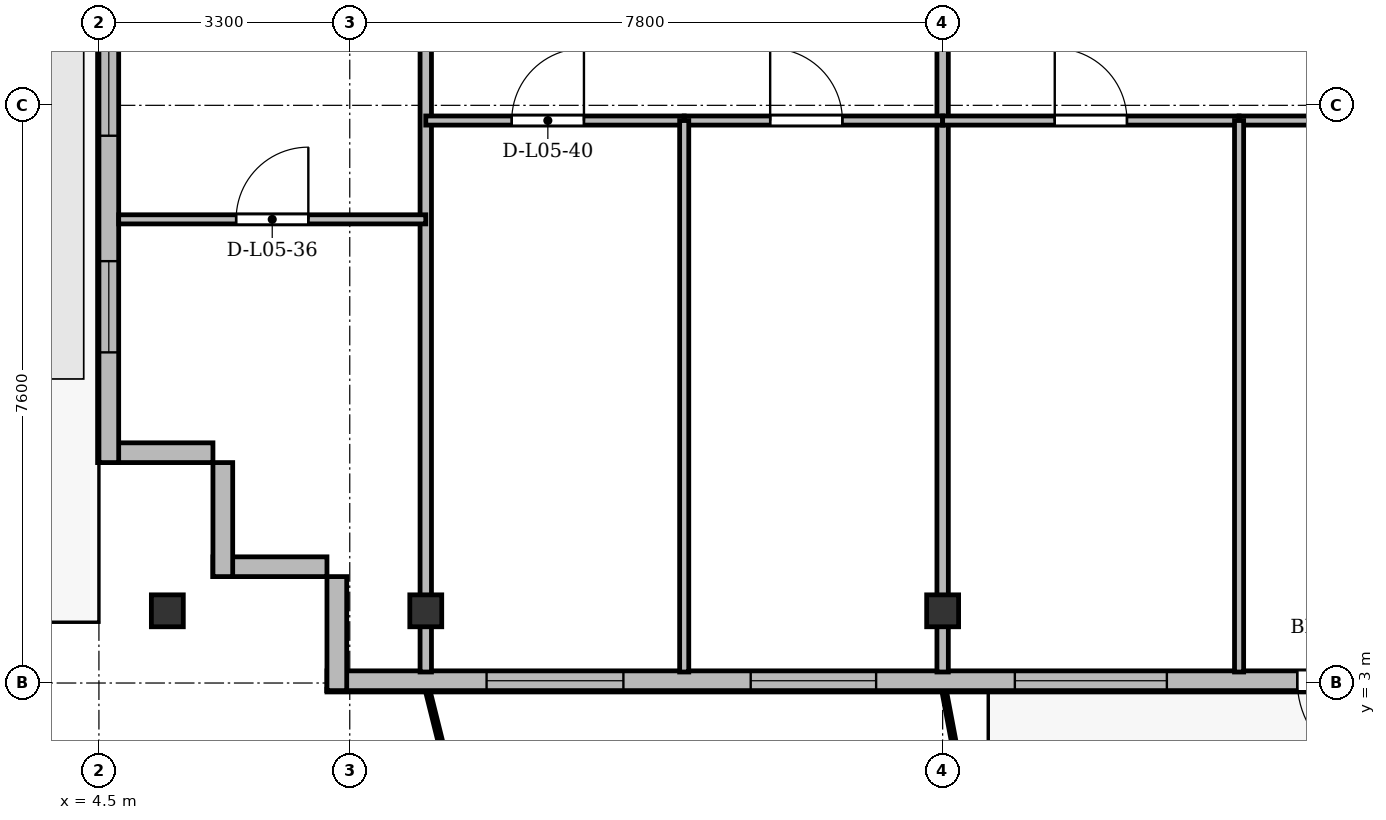
"""IFC4 building model, lengths in metres.
Left out: names, types, materials, properties, quantities, classifications, styles, units other than length and angle.
Written with IfcOpenShell. Run it as: python <this file> out.ifc"""

import sys

from ifc_helpers import new_model, si_unit, direction, frame, frame_2d, origin, origin_2d, place, context, subcontext, project, spatial, rectangle, i_section, extrude, source, transform, mapped, element, fill, save


model = new_model("IFC4")
c1 = context("Model", 3, precision=1e-05, world=origin(), true_north=direction((0.0, 1.0)))
c2 = subcontext(c1, "Body", "Model", "MODEL_VIEW")
j1 = project(units=[si_unit("LENGTHUNIT", "METRE"), si_unit("PLANEANGLEUNIT", "RADIAN")], contexts=[c1])
p1 = place(None, origin())
s1 = spatial("IfcSite", under=j1, at=p1, CompositionType="ELEMENT")
p2 = place(p1, origin())
s2 = spatial("IfcBuilding", under=s1, at=p2, CompositionType="ELEMENT")
p3 = place(p2, frame((0.0, 0.0, 23.5)))
s3 = spatial("IfcBuildingStorey", under=s2, at=p3, CompositionType="ELEMENT", Elevation=23.5)
m1 = source(origin(), c2, "Body", "SweptSolid", [
    extrude(i_section(OverallWidth=0.42, OverallDepth=0.42, WebThickness=0.026, FlangeThickness=0.04, at=origin_2d()), origin(), (0.0, 0.0, 1.0), 3.6),
])
for number, where, z_axis, x_axis in (
    (1, (5.4, 3.95, 0.0), (0.0, 0.0, 1.0), (1.0, 0.0, 0.0)),
    (2, (8.8, 3.95, 0.0), (0.0, 0.0, 1.0), (1.0, 0.0, 0.0)),
    (3, (15.6, 3.95, 0.0), (0.0, 0.0, 1.0), (1.0, 0.0, 0.0)),
):
    element("IfcColumn", number, at=place(p3, frame(where, z_axis=z_axis, x_axis=x_axis)), inside=s3, PredefinedType="COLUMN", context=c2, shape_type="MappedRepresentation", body=[
        mapped(m1, transform((0.0, 0.0, 0.0), x_axis=(1.0, 0.0, 0.0), y_axis=(0.0, 1.0, 0.0), z_axis=(0.0, 0.0, 1.0), scale=1.0)),
    ])
for number, where, z_axis, x_axis in (
    (4, (7.5, 4.53, 0.0), (0.0, 0.0, 1.0), (-1.0, 0.0, 0.0)),
    (5, (6.13, 4.4, 0.0), (0.0, 0.0, 1.0), (0.0, 1.0, 0.0)),
):
    element("IfcWall", number, at=place(p3, frame(where, z_axis=z_axis, x_axis=x_axis)), inside=s3, PredefinedType="SOLIDWALL", context=c2, shape_type="SweptSolid", body=[
        extrude(rectangle(XDim=1.5, YDim=0.26, at=frame_2d((0.75, 0.0))), origin(), (0.0, 0.0, 1.0), 3.34),
    ])
p4 = place(p3, frame((6.0, 6.03, 0.0), z_axis=(0.0, 0.0, 1.0), x_axis=(-1.0, 0.0, 0.0)))
e6 = element("IfcWall", 6, at=p4, inside=s3, PredefinedType="SOLIDWALL", context=c2, shape_type="SweptSolid", body=[
    extrude(rectangle(XDim=1.5, YDim=0.26, at=frame_2d((0.75, 0.0))), origin(), (0.0, 0.0, 1.0), 2.752),
])
p5 = place(p3, frame((4.63, 5.9, 0.0), z_axis=(0.0, 0.0, 1.0), x_axis=(0.0, 1.0, 0.0)))
e7 = element("IfcWall", 7, at=p5, inside=s3, PredefinedType="SOLIDWALL", context=c2, shape_type="SweptSolid", body=[
    extrude(rectangle(XDim=39.6, YDim=0.26, at=frame_2d((19.8, 0.0))), origin(), (0.0, 0.0, 1.0), 3.34),
])
p6 = place(p5, frame((9.745, 0.0, 0.0)))
e8 = element("IfcOpeningElement", 8, at=p6, cuts=e7, PredefinedType="OPENING", context=c2, shape_type="SweptSolid", body=[
    extrude(rectangle(XDim=1.2, YDim=2.2, at=frame_2d((0.6, 1.1))), frame((0.0, 0.14, 0.0), z_axis=(0.0, -1.0, 0.0), x_axis=(1.0, 0.0, 0.0)), (0.0, 0.0, 1.0), 0.28),
])
p7 = place(p5, frame((1.45, 0.0, 0.92)))
e9 = element("IfcOpeningElement", 9, at=p7, cuts=e7, PredefinedType="OPENING", context=c2, shape_type="SweptSolid", body=[
    extrude(rectangle(XDim=1.2, YDim=1.65, at=frame_2d((0.6, 0.825))), frame((0.0, 0.14, 0.0), z_axis=(0.0, -1.0, 0.0), x_axis=(1.0, 0.0, 0.0)), (0.0, 0.0, 1.0), 0.28),
])
p8 = place(p5, frame((4.3, 0.0, 0.92)))
e10 = element("IfcOpeningElement", 10, at=p8, cuts=e7, PredefinedType="OPENING", context=c2, shape_type="SweptSolid", body=[
    extrude(rectangle(XDim=2.4, YDim=2.1, at=frame_2d((1.2, 1.05))), frame((0.0, 0.14, 0.0), z_axis=(0.0, -1.0, 0.0), x_axis=(1.0, 0.0, 0.0)), (0.0, 0.0, 1.0), 0.28),
])
p9 = place(p5, frame((33.9, 0.0, 0.92)))
e11 = element("IfcOpeningElement", 11, at=p9, cuts=e7, PredefinedType="OPENING", context=c2, shape_type="SweptSolid", body=[
    extrude(rectangle(XDim=1.2, YDim=1.65, at=frame_2d((0.6, 0.825))), frame((0.0, 0.14, 0.0), z_axis=(0.0, -1.0, 0.0), x_axis=(1.0, 0.0, 0.0)), (0.0, 0.0, 1.0), 0.28),
])
p10 = place(p5, frame((37.25, 0.0, 0.92)))
e12 = element("IfcOpeningElement", 12, at=p10, cuts=e7, PredefinedType="OPENING", context=c2, shape_type="SweptSolid", body=[
    extrude(rectangle(XDim=1.2, YDim=1.65, at=frame_2d((0.6, 0.825))), frame((0.0, 0.14, 0.0), z_axis=(0.0, -1.0, 0.0), x_axis=(1.0, 0.0, 0.0)), (0.0, 0.0, 1.0), 0.28),
])
p11 = place(p3, frame((66.9, 3.03, 0.0), z_axis=(0.0, 0.0, 1.0), x_axis=(-1.0, 0.0, 0.0)))
e13 = element("IfcWall", 13, at=p11, inside=s3, PredefinedType="SOLIDWALL", context=c2, shape_type="SweptSolid", body=[
    extrude(rectangle(XDim=59.4, YDim=0.26, at=frame_2d((29.7, 0.0))), origin(), (0.0, 0.0, 1.0), 3.34),
])
p12 = place(p11, frame((3.6, 0.0, 0.9)))
e14 = element("IfcOpeningElement", 14, at=p12, cuts=e13, PredefinedType="OPENING", context=c2, shape_type="SweptSolid", body=[
    extrude(rectangle(XDim=2.2, YDim=1.8, at=frame_2d((1.1, 0.9))), frame((0.0, 0.14, 0.0), z_axis=(0.0, -1.0, 0.0), x_axis=(1.0, 0.0, 0.0)), (0.0, 0.0, 1.0), 0.28),
])
p13 = place(p11, frame((9.3, 0.0, 0.9)))
e15 = element("IfcOpeningElement", 15, at=p13, cuts=e13, PredefinedType="OPENING", context=c2, shape_type="SweptSolid", body=[
    extrude(rectangle(XDim=1.5, YDim=1.75, at=frame_2d((0.75, 0.875))), frame((0.0, 0.14, 0.0), z_axis=(0.0, -1.0, 0.0), x_axis=(1.0, 0.0, 0.0)), (0.0, 0.0, 1.0), 0.28),
])
p14 = place(p11, frame((12.95, 0.0, 0.9)))
e16 = element("IfcOpeningElement", 16, at=p14, cuts=e13, PredefinedType="OPENING", context=c2, shape_type="SweptSolid", body=[
    extrude(rectangle(XDim=2.0, YDim=1.95, at=frame_2d((1.0, 0.975))), frame((0.0, 0.14, 0.0), z_axis=(0.0, -1.0, 0.0), x_axis=(1.0, 0.0, 0.0)), (0.0, 0.0, 1.0), 0.28),
])
p15 = place(p11, frame((17.007, 0.0, 0.0)))
e17 = element("IfcOpeningElement", 17, at=p15, cuts=e13, PredefinedType="OPENING", context=c2, shape_type="SweptSolid", body=[
    extrude(rectangle(XDim=1.2, YDim=2.2, at=frame_2d((0.6, 1.1))), frame((0.0, 0.14, 0.0), z_axis=(0.0, -1.0, 0.0), x_axis=(1.0, 0.0, 0.0)), (0.0, 0.0, 1.0), 0.28),
])
p16 = place(p11, frame((20.4, 0.0, 0.9)))
e18 = element("IfcOpeningElement", 18, at=p16, cuts=e13, PredefinedType="OPENING", context=c2, shape_type="SweptSolid", body=[
    extrude(rectangle(XDim=1.8, YDim=1.8, at=frame_2d((0.9, 0.9))), frame((0.0, 0.14, 0.0), z_axis=(0.0, -1.0, 0.0), x_axis=(1.0, 0.0, 0.0)), (0.0, 0.0, 1.0), 0.28),
])
p17 = place(p11, frame((23.65, 0.0, 0.9)))
e19 = element("IfcOpeningElement", 19, at=p17, cuts=e13, PredefinedType="OPENING", context=c2, shape_type="SweptSolid", body=[
    extrude(rectangle(XDim=2.2, YDim=1.8, at=frame_2d((1.1, 0.9))), frame((0.0, 0.14, 0.0), z_axis=(0.0, -1.0, 0.0), x_axis=(1.0, 0.0, 0.0)), (0.0, 0.0, 1.0), 0.28),
])
p18 = place(p11, frame((27.3, 0.0, 0.9)))
e20 = element("IfcOpeningElement", 20, at=p18, cuts=e13, PredefinedType="OPENING", context=c2, shape_type="SweptSolid", body=[
    extrude(rectangle(XDim=1.5, YDim=1.75, at=frame_2d((0.75, 0.875))), frame((0.0, 0.14, 0.0), z_axis=(0.0, -1.0, 0.0), x_axis=(1.0, 0.0, 0.0)), (0.0, 0.0, 1.0), 0.28),
])
p19 = place(p11, frame((32.0, 0.0, 0.9)))
e21 = element("IfcOpeningElement", 21, at=p19, cuts=e13, PredefinedType="OPENING", context=c2, shape_type="SweptSolid", body=[
    extrude(rectangle(XDim=2.0, YDim=1.95, at=frame_2d((1.0, 0.975))), frame((0.0, 0.14, 0.0), z_axis=(0.0, -1.0, 0.0), x_axis=(1.0, 0.0, 0.0)), (0.0, 0.0, 1.0), 0.28),
])
p20 = place(p11, frame((36.675, 0.0, 0.9)))
e22 = element("IfcOpeningElement", 22, at=p20, cuts=e13, PredefinedType="OPENING", context=c2, shape_type="SweptSolid", body=[
    extrude(rectangle(XDim=1.65, YDim=1.85, at=frame_2d((0.825, 0.925))), frame((0.0, 0.14, 0.0), z_axis=(0.0, -1.0, 0.0), x_axis=(1.0, 0.0, 0.0)), (0.0, 0.0, 1.0), 0.28),
])
p21 = place(p11, frame((39.0, 0.0, 0.9)))
e23 = element("IfcOpeningElement", 23, at=p21, cuts=e13, PredefinedType="OPENING", context=c2, shape_type="SweptSolid", body=[
    extrude(rectangle(XDim=1.8, YDim=1.8, at=frame_2d((0.9, 0.9))), frame((0.0, 0.14, 0.0), z_axis=(0.0, -1.0, 0.0), x_axis=(1.0, 0.0, 0.0)), (0.0, 0.0, 1.0), 0.28),
])
p22 = place(p11, frame((41.55, 0.0, 0.9)))
e24 = element("IfcOpeningElement", 24, at=p22, cuts=e13, PredefinedType="OPENING", context=c2, shape_type="SweptSolid", body=[
    extrude(rectangle(XDim=1.5, YDim=1.75, at=frame_2d((0.75, 0.875))), frame((0.0, 0.14, 0.0), z_axis=(0.0, -1.0, 0.0), x_axis=(1.0, 0.0, 0.0)), (0.0, 0.0, 1.0), 0.28),
])
p23 = place(p11, frame((45.435, 0.0, 0.0)))
e25 = element("IfcOpeningElement", 25, at=p23, cuts=e13, PredefinedType="OPENING", context=c2, shape_type="SweptSolid", body=[
    extrude(rectangle(XDim=1.2, YDim=2.2, at=frame_2d((0.6, 1.1))), frame((0.0, 0.14, 0.0), z_axis=(0.0, -1.0, 0.0), x_axis=(1.0, 0.0, 0.0)), (0.0, 0.0, 1.0), 0.28),
])
p24 = place(p11, frame((48.35, 0.0, 0.9)))
e26 = element("IfcOpeningElement", 26, at=p24, cuts=e13, PredefinedType="OPENING", context=c2, shape_type="SweptSolid", body=[
    extrude(rectangle(XDim=2.0, YDim=1.95, at=frame_2d((1.0, 0.975))), frame((0.0, 0.14, 0.0), z_axis=(0.0, -1.0, 0.0), x_axis=(1.0, 0.0, 0.0)), (0.0, 0.0, 1.0), 0.28),
])
p25 = place(p11, frame((52.175, 0.0, 0.9)))
e27 = element("IfcOpeningElement", 27, at=p25, cuts=e13, PredefinedType="OPENING", context=c2, shape_type="SweptSolid", body=[
    extrude(rectangle(XDim=1.65, YDim=1.85, at=frame_2d((0.825, 0.925))), frame((0.0, 0.14, 0.0), z_axis=(0.0, -1.0, 0.0), x_axis=(1.0, 0.0, 0.0)), (0.0, 0.0, 1.0), 0.28),
])
p26 = place(p11, frame((55.5, 0.0, 0.9)))
e28 = element("IfcOpeningElement", 28, at=p26, cuts=e13, PredefinedType="OPENING", context=c2, shape_type="SweptSolid", body=[
    extrude(rectangle(XDim=1.8, YDim=1.8, at=frame_2d((0.9, 0.9))), frame((0.0, 0.14, 0.0), z_axis=(0.0, -1.0, 0.0), x_axis=(1.0, 0.0, 0.0)), (0.0, 0.0, 1.0), 0.28),
])
p27 = place(p3, frame((7.63, 2.9, 0.0), z_axis=(0.0, 0.0, 1.0), x_axis=(0.0, 1.0, 0.0)))
e29 = element("IfcWall", 29, at=p27, inside=s3, PredefinedType="SOLIDWALL", context=c2, shape_type="SweptSolid", body=[
    extrude(rectangle(XDim=1.5, YDim=0.26, at=frame_2d((0.75, 0.0))), origin(), (0.0, 0.0, 1.0), 2.69),
])
for number, where, z_axis, x_axis in (
    (30, (8.8, 3.145, 0.0), (0.0, 0.0, 1.0), (0.0, 1.0, 0.0)),
    (31, (15.6, 3.145, 0.0), (0.0, 0.0, 1.0), (0.0, 1.0, 0.0)),
):
    element("IfcWall", number, at=place(p3, frame(where, z_axis=z_axis, x_axis=x_axis)), inside=s3, PredefinedType="PARTITIONING", context=c2, shape_type="SweptSolid", body=[
        extrude(rectangle(XDim=24.455, YDim=0.15, at=frame_2d((12.228, 0.0))), origin(), (0.0, 0.0, 1.0), 2.752),
    ])
p28 = place(p3, frame((4.76, 9.1, 0.0), z_axis=(0.0, 0.0, 1.0), x_axis=(1.0, 0.0, 0.0)))
e32 = element("IfcWall", 32, at=p28, inside=s3, PredefinedType="PARTITIONING", context=c2, shape_type="SweptSolid", body=[
    extrude(rectangle(XDim=4.04, YDim=0.12, at=frame_2d((2.02, 0.0))), origin(), (0.0, 0.0, 1.0), 2.752),
])
p29 = place(p28, frame((1.545, 0.0, 0.0)))
e33 = element("IfcOpeningElement", 33, at=p29, cuts=e32, PredefinedType="OPENING", context=c2, shape_type="SweptSolid", body=[
    extrude(rectangle(XDim=0.95, YDim=2.15, at=frame_2d((0.475, 1.075))), frame((0.0, 0.07, 0.0), z_axis=(0.0, -1.0, 0.0), x_axis=(1.0, 0.0, 0.0)), (0.0, 0.0, 1.0), 0.14),
])
p30 = place(p3, frame((8.8, 10.4, 0.0), z_axis=(0.0, 0.0, 1.0), x_axis=(1.0, 0.0, 0.0)))
e34 = element("IfcWall", 34, at=p30, inside=s3, PredefinedType="PARTITIONING", context=c2, shape_type="SweptSolid", body=[
    extrude(rectangle(XDim=3.4, YDim=0.12, at=frame_2d((1.7, 0.0))), origin(), (0.0, 0.0, 1.0), 2.752),
])
p31 = place(p30, frame((1.131, 0.0, 0.0)))
e35 = element("IfcOpeningElement", 35, at=p31, cuts=e34, PredefinedType="OPENING", context=c2, shape_type="SweptSolid", body=[
    extrude(rectangle(XDim=0.95, YDim=2.15, at=frame_2d((0.475, 1.075))), frame((0.0, 0.07, 0.0), z_axis=(0.0, -1.0, 0.0), x_axis=(1.0, 0.0, 0.0)), (0.0, 0.0, 1.0), 0.14),
])
p32 = place(p3, frame((12.2, 10.4, 0.0), z_axis=(0.0, 0.0, 1.0), x_axis=(1.0, 0.0, 0.0)))
e36 = element("IfcWall", 36, at=p32, inside=s3, PredefinedType="PARTITIONING", context=c2, shape_type="SweptSolid", body=[
    extrude(rectangle(XDim=3.4, YDim=0.12, at=frame_2d((1.7, 0.0))), origin(), (0.0, 0.0, 1.0), 2.752),
])
p33 = place(p32, frame((1.131, 0.0, 0.0)))
e37 = element("IfcOpeningElement", 37, at=p33, cuts=e36, PredefinedType="OPENING", context=c2, shape_type="SweptSolid", body=[
    extrude(rectangle(XDim=0.95, YDim=2.15, at=frame_2d((0.475, 1.075))), frame((0.0, 0.07, 0.0), z_axis=(0.0, -1.0, 0.0), x_axis=(1.0, 0.0, 0.0)), (0.0, 0.0, 1.0), 0.14),
])
p34 = place(p3, frame((12.2, 3.145, 0.0), z_axis=(0.0, 0.0, 1.0), x_axis=(0.0, 1.0, 0.0)))
e38 = element("IfcWall", 38, at=p34, inside=s3, PredefinedType="PARTITIONING", context=c2, shape_type="SweptSolid", body=[
    extrude(rectangle(XDim=7.255, YDim=0.12, at=frame_2d((3.627, 0.0))), origin(), (0.0, 0.0, 1.0), 2.69),
])
p35 = place(p3, frame((15.6, 10.4, 0.0), z_axis=(0.0, 0.0, 1.0), x_axis=(1.0, 0.0, 0.0)))
e39 = element("IfcWall", 39, at=p35, inside=s3, PredefinedType="PARTITIONING", context=c2, shape_type="SweptSolid", body=[
    extrude(rectangle(XDim=3.9, YDim=0.12, at=frame_2d((1.95, 0.0))), origin(), (0.0, 0.0, 1.0), 2.752),
])
p36 = place(p35, frame((1.475, 0.0, 0.0)))
e40 = element("IfcOpeningElement", 40, at=p36, cuts=e39, PredefinedType="OPENING", context=c2, shape_type="SweptSolid", body=[
    extrude(rectangle(XDim=0.95, YDim=2.15, at=frame_2d((0.475, 1.075))), frame((0.0, 0.07, 0.0), z_axis=(0.0, -1.0, 0.0), x_axis=(1.0, 0.0, 0.0)), (0.0, 0.0, 1.0), 0.14),
])
p37 = place(p3, frame((19.5, 10.4, 0.0), z_axis=(0.0, 0.0, 1.0), x_axis=(1.0, 0.0, 0.0)))
e41 = element("IfcWall", 41, at=p37, inside=s3, PredefinedType="PARTITIONING", context=c2, shape_type="SweptSolid", body=[
    extrude(rectangle(XDim=3.9, YDim=0.12, at=frame_2d((1.95, 0.0))), origin(), (0.0, 0.0, 1.0), 2.752),
])
p38 = place(p37, frame((1.475, 0.0, 0.0)))
e42 = element("IfcOpeningElement", 42, at=p38, cuts=e41, PredefinedType="OPENING", context=c2, shape_type="SweptSolid", body=[
    extrude(rectangle(XDim=0.95, YDim=2.15, at=frame_2d((0.475, 1.075))), frame((0.0, 0.07, 0.0), z_axis=(0.0, -1.0, 0.0), x_axis=(1.0, 0.0, 0.0)), (0.0, 0.0, 1.0), 0.14),
])
p39 = place(p3, frame((19.5, 3.145, 0.0), z_axis=(0.0, 0.0, 1.0), x_axis=(0.0, 1.0, 0.0)))
e43 = element("IfcWall", 43, at=p39, inside=s3, PredefinedType="PARTITIONING", context=c2, shape_type="SweptSolid", body=[
    extrude(rectangle(XDim=7.255, YDim=0.12, at=frame_2d((3.627, 0.0))), origin(), (0.0, 0.0, 1.0), 2.69),
])
m2 = source(origin(), c2, "Body", "SweptSolid", [
    extrude(rectangle(XDim=1.2, YDim=1.65, at=frame_2d((0.6, 0.825))), frame((0.0, 0.03, 0.0), z_axis=(0.0, -1.0, 0.0), x_axis=(1.0, 0.0, 0.0)), (0.0, 0.0, 1.0), 0.06),
])
p40 = place(p7, origin())
e44 = element("IfcWindow", 44, at=p40, inside=s3, PartitioningType="SINGLE_PANEL", PredefinedType="WINDOW", context=c2, shape_type="MappedRepresentation", body=[
    mapped(m2, transform((0.0, 0.0, 0.0), x_axis=(1.0, 0.0, 0.0), y_axis=(0.0, 1.0, 0.0), z_axis=(0.0, 0.0, 1.0), scale=1.0)),
])
fill(e9, e44)
m3 = source(origin(), c2, "Body", "SweptSolid", [
    extrude(rectangle(XDim=2.4, YDim=2.1, at=frame_2d((1.2, 1.05))), frame((0.0, 0.03, 0.0), z_axis=(0.0, -1.0, 0.0), x_axis=(1.0, 0.0, 0.0)), (0.0, 0.0, 1.0), 0.06),
])
p41 = place(p8, origin())
e45 = element("IfcWindow", 45, at=p41, inside=s3, PartitioningType="SINGLE_PANEL", PredefinedType="WINDOW", context=c2, shape_type="MappedRepresentation", body=[
    mapped(m3, transform((0.0, 0.0, 0.0), x_axis=(1.0, 0.0, 0.0), y_axis=(0.0, 1.0, 0.0), z_axis=(0.0, 0.0, 1.0), scale=1.0)),
])
fill(e10, e45)
m4 = source(origin(), c2, "Body", "SweptSolid", [
    extrude(rectangle(XDim=1.2, YDim=2.2, at=frame_2d((0.6, 1.1))), frame((0.0, 0.025, 0.0), z_axis=(0.0, -1.0, 0.0), x_axis=(1.0, 0.0, 0.0)), (0.0, 0.0, 1.0), 0.05),
])
p42 = place(p23, origin())
e46 = element("IfcDoor", 46, at=p42, inside=s3, OperationType="SINGLE_SWING_LEFT", PredefinedType="DOOR", context=c2, shape_type="MappedRepresentation", body=[
    mapped(m4, transform((0.0, 0.0, 0.0), x_axis=(1.0, 0.0, 0.0), y_axis=(0.0, 1.0, 0.0), z_axis=(0.0, 0.0, 1.0), scale=1.0)),
])
fill(e25, e46)
m5 = source(origin(), c2, "Body", "SweptSolid", [
    extrude(rectangle(XDim=2.0, YDim=1.95, at=frame_2d((1.0, 0.975))), frame((0.0, 0.03, 0.0), z_axis=(0.0, -1.0, 0.0), x_axis=(1.0, 0.0, 0.0)), (0.0, 0.0, 1.0), 0.06),
])
p43 = place(p24, origin())
e47 = element("IfcWindow", 47, at=p43, inside=s3, PartitioningType="SINGLE_PANEL", PredefinedType="WINDOW", context=c2, shape_type="MappedRepresentation", body=[
    mapped(m5, transform((0.0, 0.0, 0.0), x_axis=(1.0, 0.0, 0.0), y_axis=(0.0, 1.0, 0.0), z_axis=(0.0, 0.0, 1.0), scale=1.0)),
])
fill(e26, e47)
m6 = source(origin(), c2, "Body", "SweptSolid", [
    extrude(rectangle(XDim=1.65, YDim=1.85, at=frame_2d((0.825, 0.925))), frame((0.0, 0.03, 0.0), z_axis=(0.0, -1.0, 0.0), x_axis=(1.0, 0.0, 0.0)), (0.0, 0.0, 1.0), 0.06),
])
p44 = place(p25, origin())
e48 = element("IfcWindow", 48, at=p44, inside=s3, PartitioningType="SINGLE_PANEL", PredefinedType="WINDOW", context=c2, shape_type="MappedRepresentation", body=[
    mapped(m6, transform((0.0, 0.0, 0.0), x_axis=(1.0, 0.0, 0.0), y_axis=(0.0, 1.0, 0.0), z_axis=(0.0, 0.0, 1.0), scale=1.0)),
])
fill(e27, e48)
m7 = source(origin(), c2, "Body", "SweptSolid", [
    extrude(rectangle(XDim=1.8, YDim=1.8, at=frame_2d((0.9, 0.9))), frame((0.0, 0.03, 0.0), z_axis=(0.0, -1.0, 0.0), x_axis=(1.0, 0.0, 0.0)), (0.0, 0.0, 1.0), 0.06),
])
p45 = place(p26, origin())
e49 = element("IfcWindow", 49, at=p45, inside=s3, PartitioningType="SINGLE_PANEL", PredefinedType="WINDOW", context=c2, shape_type="MappedRepresentation", body=[
    mapped(m7, transform((0.0, 0.0, 0.0), x_axis=(1.0, 0.0, 0.0), y_axis=(0.0, 1.0, 0.0), z_axis=(0.0, 0.0, 1.0), scale=1.0)),
])
fill(e28, e49)
m8 = source(origin(), c2, "Body", "SweptSolid", [
    extrude(rectangle(XDim=0.95, YDim=2.15, at=frame_2d((0.475, 1.075))), frame((0.0, 0.025, 0.0), z_axis=(0.0, -1.0, 0.0), x_axis=(1.0, 0.0, 0.0)), (0.0, 0.0, 1.0), 0.05),
])
p46 = place(p29, origin())
e50 = element("IfcDoor", 50, at=p46, inside=s3, OperationType="SINGLE_SWING_RIGHT", PredefinedType="DOOR", context=c2, shape_type="MappedRepresentation", body=[
    mapped(m8, transform((0.0, 0.0, 0.0), x_axis=(1.0, 0.0, 0.0), y_axis=(0.0, 1.0, 0.0), z_axis=(0.0, 0.0, 1.0), scale=1.0)),
])
fill(e33, e50)
p47 = place(p31, origin())
e51 = element("IfcDoor", 51, at=p47, inside=s3, OperationType="SINGLE_SWING_RIGHT", PredefinedType="DOOR", context=c2, shape_type="MappedRepresentation", body=[
    mapped(m8, transform((0.0, 0.0, 0.0), x_axis=(1.0, 0.0, 0.0), y_axis=(0.0, 1.0, 0.0), z_axis=(0.0, 0.0, 1.0), scale=1.0)),
])
fill(e35, e51)
p48 = place(p33, origin())
e52 = element("IfcDoor", 52, at=p48, inside=s3, OperationType="SINGLE_SWING_LEFT", PredefinedType="DOOR", context=c2, shape_type="MappedRepresentation", body=[
    mapped(m8, transform((0.0, 0.0, 0.0), x_axis=(1.0, 0.0, 0.0), y_axis=(0.0, 1.0, 0.0), z_axis=(0.0, 0.0, 1.0), scale=1.0)),
])
fill(e37, e52)
p49 = place(p36, origin())
e53 = element("IfcDoor", 53, at=p49, inside=s3, OperationType="SINGLE_SWING_LEFT", PredefinedType="DOOR", context=c2, shape_type="MappedRepresentation", body=[
    mapped(m8, transform((0.0, 0.0, 0.0), x_axis=(1.0, 0.0, 0.0), y_axis=(0.0, 1.0, 0.0), z_axis=(0.0, 0.0, 1.0), scale=1.0)),
])
fill(e40, e53)
save(model, sys.argv[1])
